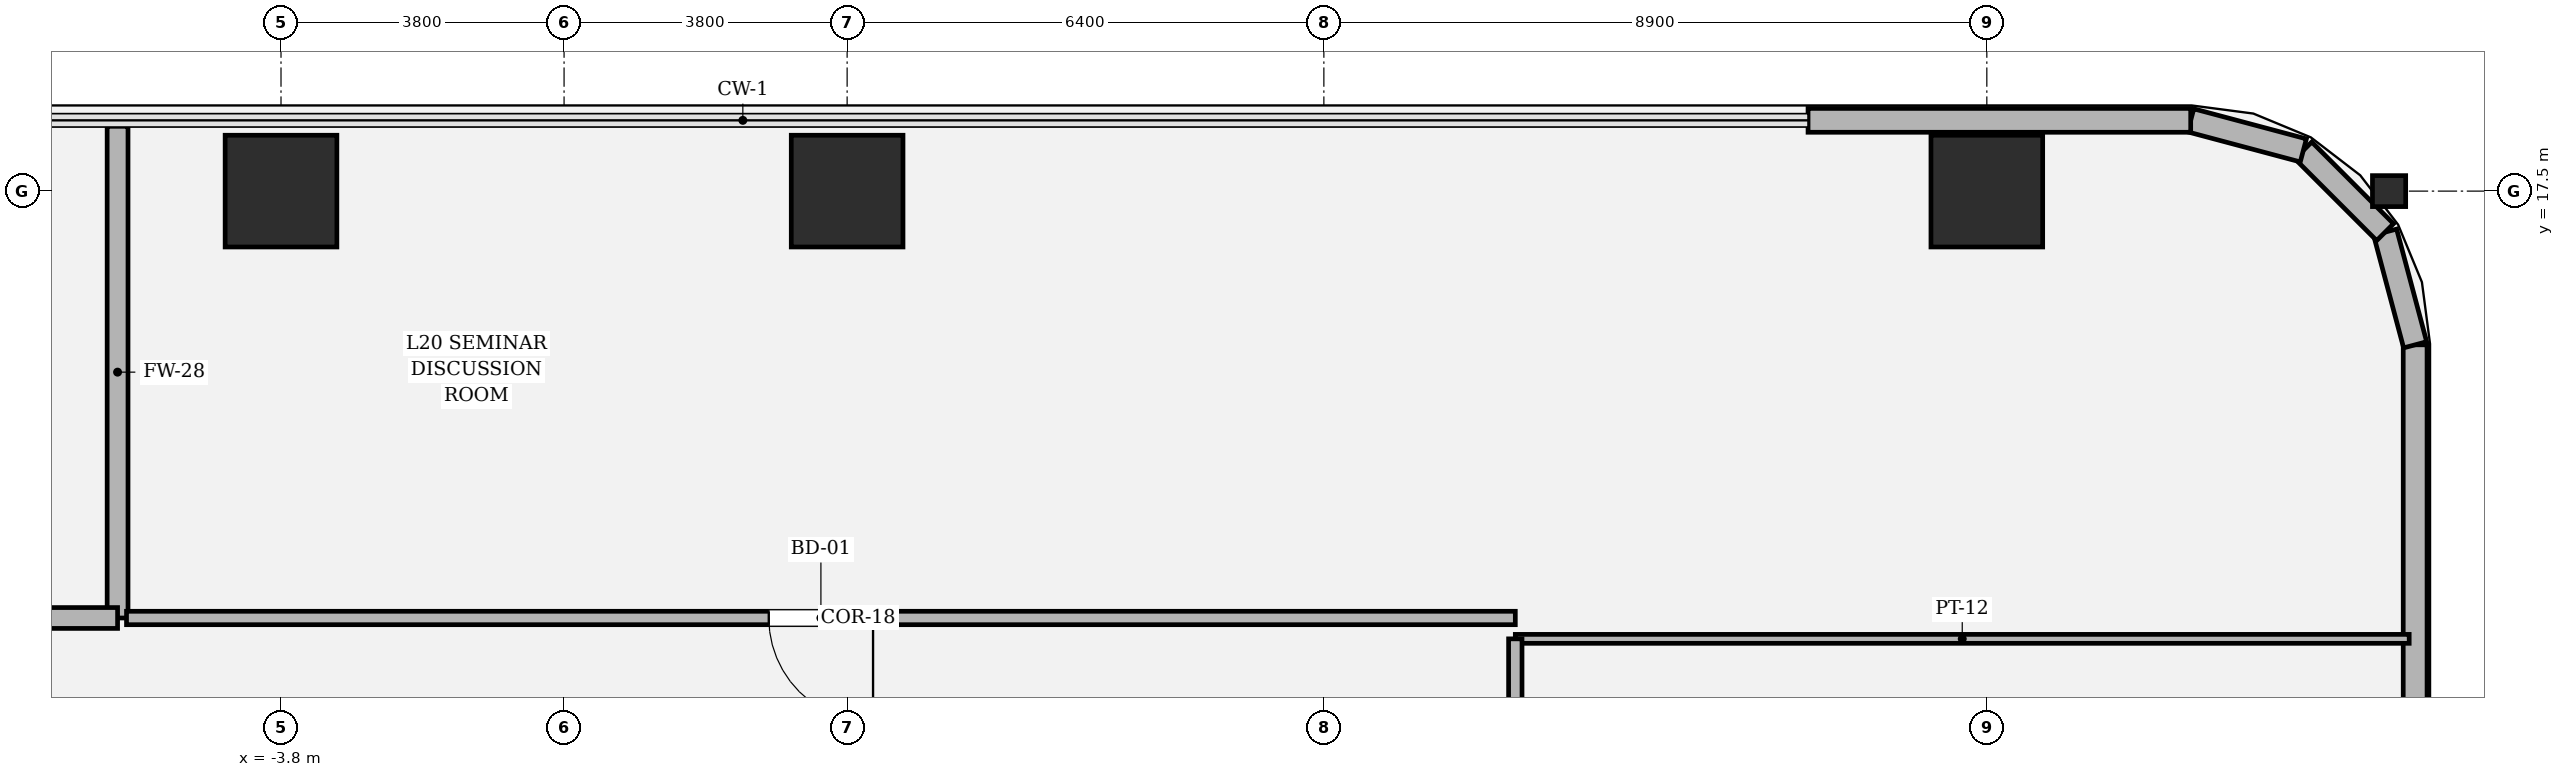
"""IFC4 building model, lengths in metres.
Left out: names, types, materials, properties, quantities, classifications, styles, units other than length and angle.
Written with IfcOpenShell. Run it as: python <this file> out.ifc"""

import sys

from ifc_helpers import new_model, si_unit, direction, frame, frame_2d, origin, origin_2d, place, context, subcontext, project, spatial, rectangle, hollow_rectangle, i_section, extrude, element, fill, save


model = new_model("IFC4")
c1 = context("Model", 3, precision=1e-05, world=origin(), true_north=direction((0.0, 1.0)))
c2 = subcontext(c1, "Body", "Model", "MODEL_VIEW")
j1 = project(units=[si_unit("LENGTHUNIT", "METRE"), si_unit("PLANEANGLEUNIT", "RADIAN")], contexts=[c1])
p1 = place(None, origin())
s1 = spatial("IfcSite", under=j1, at=p1, CompositionType="ELEMENT")
p2 = place(p1, origin())
s2 = spatial("IfcBuilding", under=s1, at=p2, CompositionType="ELEMENT")
p3 = place(p2, frame((0.0, 0.0, 88.95)))
s3 = spatial("IfcBuildingStorey", under=s2, at=p3, CompositionType="ELEMENT", Elevation=88.95)
for number, where, z_axis, x_axis in (
    (1, (19.1, 17.5, 0.0), (0.0, 0.0, 1.0), (1.0, 0.0, 0.0)),
    (2, (3.8, 17.5, 0.0), (0.0, 0.0, 1.0), (1.0, 0.0, 0.0)),
    (3, (-3.8, 17.5, 0.0), (0.0, 0.0, 1.0), (1.0, 0.0, 0.0)),
):
    element("IfcColumn", number, at=place(p3, frame(where, z_axis=z_axis, x_axis=x_axis)), inside=s3, PredefinedType="COLUMN", context=c2, shape_type="SweptSolid", body=[
        extrude(hollow_rectangle(XDim=1.5, YDim=1.5, WallThickness=0.045, at=origin_2d()), origin(), (0.0, 0.0, 1.0), 4.05),
    ])
p4 = place(p3, frame((24.5, 17.5, 0.0), z_axis=(0.0, 0.0, 1.0), x_axis=(0.0, 1.0, 0.0)))
e4 = element("IfcColumn", 4, at=p4, inside=s3, PredefinedType="COLUMN", context=c2, shape_type="SweptSolid", body=[
    extrude(i_section(OverallWidth=0.416, OverallDepth=0.446, WebThickness=0.039, FlangeThickness=0.062, FilletRadius=0.018, at=origin_2d()), origin(), (0.0, 0.0, 1.0), 4.048),
])
p5 = place(p3, frame((24.85, 10.3, 0.0), z_axis=(0.0, 0.0, 1.0), x_axis=(0.0, 1.0, 0.0)))
e5 = element("IfcWall", 5, at=p5, inside=s3, PredefinedType="SOLIDWALL", context=c2, shape_type="SweptSolid", body=[
    extrude(rectangle(XDim=5.137, YDim=0.32, at=frame_2d((2.568, 0.0))), origin(), (0.0, 0.0, 1.0), 2.444),
])
p6 = place(p3, frame((24.85, 15.437, 0.0), z_axis=(0.0, 0.0, 1.0), x_axis=(-0.257847112249, 0.966185730957, 0.0)))
e6 = element("IfcWall", 6, at=p6, inside=s3, PredefinedType="SOLIDWALL", context=c2, shape_type="SweptSolid", body=[
    extrude(rectangle(XDim=1.565, YDim=0.32, at=frame_2d((0.783, 0.0))), origin(), (0.0, 0.0, 1.0), 2.444),
])
p7 = place(p3, frame((24.447, 16.949, 0.0), z_axis=(0.0, 0.0, 1.0), x_axis=(-0.707106781187, 0.707106781187, 0.0)))
e7 = element("IfcWall", 7, at=p7, inside=s3, PredefinedType="SOLIDWALL", context=c2, shape_type="SweptSolid", body=[
    extrude(rectangle(XDim=1.552, YDim=0.32, at=frame_2d((0.776, 0.0))), origin(), (0.0, 0.0, 1.0), 2.444),
])
p8 = place(p3, frame((23.349, 18.047, 0.0), z_axis=(0.0, 0.0, 1.0), x_axis=(-0.966224582397, 0.257701486942, 0.0)))
e8 = element("IfcWall", 8, at=p8, inside=s3, PredefinedType="SOLIDWALL", context=c2, shape_type="SweptSolid", body=[
    extrude(rectangle(XDim=1.565, YDim=0.32, at=frame_2d((0.783, 0.0))), origin(), (0.0, 0.0, 1.0), 3.77),
])
p9 = place(p3, frame((21.837, 18.45, 0.0), z_axis=(0.0, 0.0, 1.0), x_axis=(-1.0, 0.0, 0.0)))
e9 = element("IfcWall", 9, at=p9, inside=s3, PredefinedType="SOLIDWALL", context=c2, shape_type="SweptSolid", body=[
    extrude(rectangle(XDim=5.137, YDim=0.32, at=frame_2d((2.568, 0.0))), origin(), (0.0, 0.0, 1.0), 2.444),
])
p10 = place(p3, frame((12.77, 11.49, 0.0), z_axis=(0.0, 0.0, 1.0), x_axis=(1.0, 0.0, 0.0)))
e10 = element("IfcWall", 10, at=p10, inside=s3, PredefinedType="PARTITIONING", context=c2, shape_type="SweptSolid", body=[
    extrude(rectangle(XDim=12.0, YDim=0.12, at=frame_2d((6.0, 0.0))), origin(), (0.0, 0.0, 1.0), 2.444),
])
p11 = place(p3, frame((12.77, -3.174, 0.0), z_axis=(0.0, 0.0, 1.0), x_axis=(0.0, 1.0, 0.0)))
e11 = element("IfcWall", 11, at=p11, inside=s3, PredefinedType="PARTITIONING", context=c2, shape_type="SweptSolid", body=[
    extrude(rectangle(XDim=14.664, YDim=0.18, at=frame_2d((7.332, 0.0))), origin(), (0.0, 0.0, 1.0), 2.444),
])
p12 = place(p11, frame((6.807, 0.0, 0.0)))
e12 = element("IfcOpeningElement", 12, at=p12, cuts=e11, PredefinedType="OPENING", context=c2, shape_type="SweptSolid", body=[
    extrude(rectangle(XDim=1.05, YDim=2.2, at=frame_2d((0.525, 1.1))), frame((0.0, 0.1, 0.0), z_axis=(0.0, -1.0, 0.0), x_axis=(1.0, 0.0, 0.0)), (0.0, 0.0, 1.0), 0.2),
])
p13 = place(p3, frame((-5.994, 18.37, 0.0), z_axis=(0.0, 0.0, 1.0), x_axis=(0.0, -1.0, 0.0)))
e13 = element("IfcWall", 13, at=p13, inside=s3, PredefinedType="SOLIDWALL", context=c2, shape_type="SweptSolid", body=[
    extrude(rectangle(XDim=6.6, YDim=0.28, at=frame_2d((3.3, 0.0))), origin(), (0.0, 0.0, 1.0), 2.444),
])
p14 = place(p3, frame((-5.994, 11.77, 0.0), z_axis=(0.0, 0.0, 1.0), x_axis=(-1.0, 0.0, 0.0)))
e14 = element("IfcWall", 14, at=p14, inside=s3, PredefinedType="SOLIDWALL", context=c2, shape_type="SweptSolid", body=[
    extrude(rectangle(XDim=6.776, YDim=0.28, at=frame_2d((3.388, 0.0))), origin(), (0.0, 0.0, 1.0), 2.444),
])
p15 = place(p14, frame((2.838, 0.0, 0.0)))
e15 = element("IfcOpeningElement", 15, at=p15, cuts=e14, PredefinedType="OPENING", context=c2, shape_type="SweptSolid", body=[
    extrude(rectangle(XDim=1.1, YDim=2.2, at=frame_2d((0.55, 1.1))), frame((0.0, 0.15, 0.0), z_axis=(0.0, -1.0, 0.0), x_axis=(1.0, 0.0, 0.0)), (0.0, 0.0, 1.0), 0.3),
])
p16 = place(p3, frame((12.77, 11.77, 0.0), z_axis=(0.0, 0.0, 1.0), x_axis=(-1.0, 0.0, 0.0)))
e16 = element("IfcWall", 16, at=p16, inside=s3, PredefinedType="PARTITIONING", context=c2, shape_type="SweptSolid", body=[
    extrude(rectangle(XDim=18.644, YDim=0.18, at=frame_2d((9.322, 0.0))), origin(), (0.0, 0.0, 1.0), 2.444),
])
p17 = place(p16, frame((8.622, 0.0, 0.0)))
e17 = element("IfcOpeningElement", 17, at=p17, cuts=e16, PredefinedType="OPENING", context=c2, shape_type="SweptSolid", body=[
    extrude(rectangle(XDim=1.4, YDim=2.25, at=frame_2d((0.7, 1.125))), frame((0.0, 0.1, 0.0), z_axis=(0.0, -1.0, 0.0), x_axis=(1.0, 0.0, 0.0)), (0.0, 0.0, 1.0), 0.2),
])
p18 = place(p17, origin())
e18 = element("IfcDoor", 18, at=p18, inside=s3, OperationType="SINGLE_SWING_LEFT", PredefinedType="DOOR", context=c2, shape_type="SweptSolid", body=[
    extrude(rectangle(XDim=1.4, YDim=2.25, at=frame_2d((0.7, 1.125))), frame((0.0, 0.025, 0.0), z_axis=(0.0, -1.0, 0.0), x_axis=(1.0, 0.0, 0.0)), (0.0, 0.0, 1.0), 0.05),
])
fill(e17, e18)
save(model, sys.argv[1])
